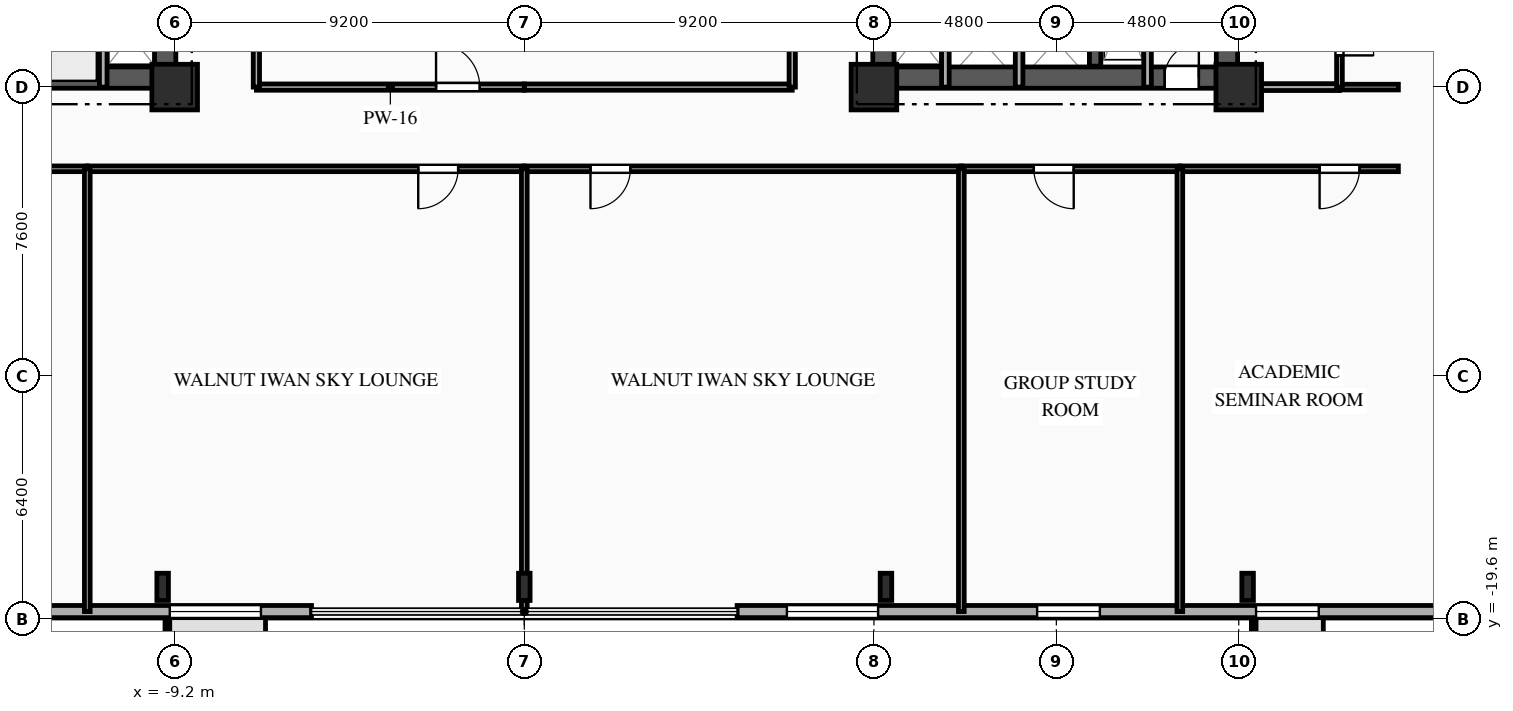
"""IFC4 building model, lengths in metres.
Left out: names, types, materials, properties, quantities, classifications, styles, units other than length and angle.
Written with IfcOpenShell. Run it as: python <this file> out.ifc"""

import sys

from ifc_helpers import new_model, si_unit, direction, frame, frame_2d, origin, origin_2d, place, context, subcontext, project, spatial, rectangle, i_section, extrude, element, fill, save


model = new_model("IFC4")
c1 = context("Model", 3, precision=1e-05, world=origin(), true_north=direction((0.0, 1.0)))
c2 = subcontext(c1, "Body", "Model", "MODEL_VIEW")
j1 = project(units=[si_unit("LENGTHUNIT", "METRE"), si_unit("PLANEANGLEUNIT", "RADIAN")], contexts=[c1])
p1 = place(None, origin())
s1 = spatial("IfcSite", under=j1, at=p1, CompositionType="ELEMENT")
p2 = place(p1, origin())
s2 = spatial("IfcBuilding", under=s1, at=p2, CompositionType="ELEMENT")
p3 = place(p2, frame((0.0, 0.0, 43.75)))
s3 = spatial("IfcBuildingStorey", under=s2, at=p3, CompositionType="ELEMENT", Elevation=43.75)
for number, where, z_axis, x_axis in (
    (1, (-9.2, -5.6, 0.0), (0.0, 0.0, 1.0), (1.0, 0.0, 0.0)),
    (2, (9.2, -5.6, 0.0), (0.0, 0.0, 1.0), (1.0, 0.0, 0.0)),
    (3, (18.8, -5.6, 0.0), (0.0, 0.0, 1.0), (1.0, 0.0, 0.0)),
):
    element("IfcColumn", number, at=place(p3, frame(where, z_axis=z_axis, x_axis=x_axis)), inside=s3, PredefinedType="COLUMN", context=c2, shape_type="SweptSolid", body=[
        extrude(rectangle(XDim=1.2, YDim=1.2, at=origin_2d()), origin(), (0.0, 0.0, 1.0), 3.35),
    ])
for number, where, z_axis, x_axis in (
    (4, (-9.517, -18.75, 0.0), (0.0, 0.0, 1.0), (1.0, 0.0, 0.0)),
    (5, (0.0, -18.75, 0.0), (0.0, 0.0, 1.0), (1.0, 0.0, 0.0)),
    (6, (9.517, -18.75, 0.0), (0.0, 0.0, 1.0), (1.0, 0.0, 0.0)),
    (7, (19.033, -18.75, 0.0), (0.0, 0.0, 1.0), (1.0, 0.0, 0.0)),
):
    element("IfcColumn", number, at=place(p3, frame(where, z_axis=z_axis, x_axis=x_axis)), inside=s3, PredefinedType="COLUMN", context=c2, shape_type="SweptSolid", body=[
        extrude(i_section(OverallWidth=0.304, OverallDepth=0.716, WebThickness=0.021, FlangeThickness=0.04, FilletRadius=0.027, at=origin_2d()), origin(), (0.0, 0.0, 1.0), 3.35),
    ])
p4 = place(p3, frame((29.2, -19.4, 0.0), z_axis=(0.0, 0.0, 1.0), x_axis=(-1.0, 0.0, 0.0)))
e8 = element("IfcWall", 8, at=p4, inside=s3, PredefinedType="SOLIDWALL", context=c2, shape_type="SweptSolid", body=[
    extrude(rectangle(XDim=23.6, YDim=0.32, at=frame_2d((11.8, 0.0))), origin(), (0.0, 0.0, 1.0), 3.035),
])
p5 = place(p4, frame((8.295, 0.0, 0.85)))
e9 = element("IfcOpeningElement", 9, at=p5, cuts=e8, PredefinedType="OPENING", context=c2, shape_type="SweptSolid", body=[
    extrude(rectangle(XDim=1.65, YDim=1.85, at=frame_2d((0.825, 0.925))), frame((0.0, 0.17, 0.0), z_axis=(0.0, -1.0, 0.0), x_axis=(1.0, 0.0, 0.0)), (0.0, 0.0, 1.0), 0.34),
])
p6 = place(p4, frame((14.055, 0.0, 0.85)))
e10 = element("IfcOpeningElement", 10, at=p6, cuts=e8, PredefinedType="OPENING", context=c2, shape_type="SweptSolid", body=[
    extrude(rectangle(XDim=1.65, YDim=1.85, at=frame_2d((0.825, 0.925))), frame((0.0, 0.17, 0.0), z_axis=(0.0, -1.0, 0.0), x_axis=(1.0, 0.0, 0.0)), (0.0, 0.0, 1.0), 0.34),
])
p7 = place(p4, frame((19.89, 0.0, 0.85)))
e11 = element("IfcOpeningElement", 11, at=p7, cuts=e8, PredefinedType="OPENING", context=c2, shape_type="SweptSolid", body=[
    extrude(rectangle(XDim=2.4, YDim=1.95, at=frame_2d((1.2, 0.975))), frame((0.0, 0.17, 0.0), z_axis=(0.0, -1.0, 0.0), x_axis=(1.0, 0.0, 0.0)), (0.0, 0.0, 1.0), 0.34),
])
p8 = place(p3, frame((-5.6, -19.4, 0.0), z_axis=(0.0, 0.0, 1.0), x_axis=(-1.0, 0.0, 0.0)))
e12 = element("IfcWall", 12, at=p8, inside=s3, PredefinedType="SOLIDWALL", context=c2, shape_type="SweptSolid", body=[
    extrude(rectangle(XDim=23.6, YDim=0.32, at=frame_2d((11.8, 0.0))), origin(), (0.0, 0.0, 1.0), 3.035),
])
p9 = place(p8, frame((1.33, 0.0, 0.85)))
e13 = element("IfcOpeningElement", 13, at=p9, cuts=e12, PredefinedType="OPENING", context=c2, shape_type="SweptSolid", body=[
    extrude(rectangle(XDim=2.4, YDim=1.95, at=frame_2d((1.2, 0.975))), frame((0.0, 0.17, 0.0), z_axis=(0.0, -1.0, 0.0), x_axis=(1.0, 0.0, 0.0)), (0.0, 0.0, 1.0), 0.34),
])
p10 = place(p8, frame((7.975, 0.0, 0.85)))
e14 = element("IfcOpeningElement", 14, at=p10, cuts=e12, PredefinedType="OPENING", context=c2, shape_type="SweptSolid", body=[
    extrude(rectangle(XDim=1.65, YDim=1.85, at=frame_2d((0.825, 0.925))), frame((0.0, 0.17, 0.0), z_axis=(0.0, -1.0, 0.0), x_axis=(1.0, 0.0, 0.0)), (0.0, 0.0, 1.0), 0.34),
])
p11 = place(p8, frame((13.735, 0.0, 0.85)))
e15 = element("IfcOpeningElement", 15, at=p11, cuts=e12, PredefinedType="OPENING", context=c2, shape_type="SweptSolid", body=[
    extrude(rectangle(XDim=1.65, YDim=1.85, at=frame_2d((0.825, 0.925))), frame((0.0, 0.17, 0.0), z_axis=(0.0, -1.0, 0.0), x_axis=(1.0, 0.0, 0.0)), (0.0, 0.0, 1.0), 0.34),
])
p12 = place(p3, frame((-18.8, -5.35, 0.0), z_axis=(0.0, 0.0, 1.0), x_axis=(1.0, 0.0, 0.0)))
e16 = element("IfcWall", 16, at=p12, inside=s3, PredefinedType="SHEAR", context=c2, shape_type="SweptSolid", body=[
    extrude(rectangle(XDim=9.6, YDim=0.56, at=frame_2d((4.8, 0.0))), origin(), (0.0, 0.0, 1.0), 3.035),
])
p13 = place(p12, frame((1.05, 0.0, 0.0)))
e17 = element("IfcOpeningElement", 17, at=p13, cuts=e16, PredefinedType="OPENING", context=c2, shape_type="SweptSolid", body=[
    extrude(rectangle(XDim=0.9, YDim=2.1, at=frame_2d((0.45, 1.05))), frame((0.0, 0.29, 0.0), z_axis=(0.0, -1.0, 0.0), x_axis=(1.0, 0.0, 0.0)), (0.0, 0.0, 1.0), 0.58),
])
p14 = place(p3, frame((-9.45, -5.05, 0.0), z_axis=(0.0, 0.0, 1.0), x_axis=(0.0, 1.0, 0.0)))
e18 = element("IfcWall", 18, at=p14, inside=s3, PredefinedType="SHEAR", context=c2, shape_type="SweptSolid", body=[
    extrude(rectangle(XDim=10.1, YDim=0.56, at=frame_2d((5.05, 0.0))), origin(), (0.0, 0.0, 1.0), 3.035),
])
p15 = place(p14, frame((7.175, 0.0, 0.0)))
e19 = element("IfcOpeningElement", 19, at=p15, cuts=e18, PredefinedType="OPENING", context=c2, shape_type="SweptSolid", body=[
    extrude(rectangle(XDim=0.9, YDim=2.1, at=frame_2d((0.45, 1.05))), frame((0.0, 0.29, 0.0), z_axis=(0.0, -1.0, 0.0), x_axis=(1.0, 0.0, 0.0)), (0.0, 0.0, 1.0), 0.58),
])
p16 = place(p14, frame((2.4, 0.0, 0.0)))
e20 = element("IfcOpeningElement", 20, at=p16, cuts=e18, PredefinedType="OPENING", context=c2, shape_type="SweptSolid", body=[
    extrude(rectangle(XDim=1.2, YDim=2.15, at=frame_2d((0.6, 1.075))), frame((0.0, 0.29, 0.0), z_axis=(0.0, -1.0, 0.0), x_axis=(1.0, 0.0, 0.0)), (0.0, 0.0, 1.0), 0.58),
])
p17 = place(p3, frame((9.2, -5.35, 0.0), z_axis=(0.0, 0.0, 1.0), x_axis=(1.0, 0.0, 0.0)))
e21 = element("IfcWall", 21, at=p17, inside=s3, PredefinedType="SHEAR", context=c2, shape_type="SweptSolid", body=[
    extrude(rectangle(XDim=9.6, YDim=0.56, at=frame_2d((4.8, 0.0))), origin(), (0.0, 0.0, 1.0), 3.035),
])
p18 = place(p17, frame((7.65, 0.0, 0.0)))
e22 = element("IfcOpeningElement", 22, at=p18, cuts=e21, PredefinedType="OPENING", context=c2, shape_type="SweptSolid", body=[
    extrude(rectangle(XDim=0.9, YDim=2.1, at=frame_2d((0.45, 1.05))), frame((0.0, 0.29, 0.0), z_axis=(0.0, -1.0, 0.0), x_axis=(1.0, 0.0, 0.0)), (0.0, 0.0, 1.0), 0.58),
])
p19 = place(p3, frame((9.45, -5.05, 0.0), z_axis=(0.0, 0.0, 1.0), x_axis=(0.0, 1.0, 0.0)))
e23 = element("IfcWall", 23, at=p19, inside=s3, PredefinedType="SHEAR", context=c2, shape_type="SweptSolid", body=[
    extrude(rectangle(XDim=10.1, YDim=0.56, at=frame_2d((5.05, 0.0))), origin(), (0.0, 0.0, 1.0), 3.035),
])
p20 = place(p19, frame((7.15, 0.0, 0.0)))
e24 = element("IfcOpeningElement", 24, at=p20, cuts=e23, PredefinedType="OPENING", context=c2, shape_type="SweptSolid", body=[
    extrude(rectangle(XDim=0.9, YDim=2.1, at=frame_2d((0.45, 1.05))), frame((0.0, 0.29, 0.0), z_axis=(0.0, -1.0, 0.0), x_axis=(1.0, 0.0, 0.0)), (0.0, 0.0, 1.0), 0.58),
])
p21 = place(p19, frame((2.4, 0.0, 0.0)))
e25 = element("IfcOpeningElement", 25, at=p21, cuts=e23, PredefinedType="OPENING", context=c2, shape_type="SweptSolid", body=[
    extrude(rectangle(XDim=1.2, YDim=2.15, at=frame_2d((0.6, 1.075))), frame((0.0, 0.29, 0.0), z_axis=(0.0, -1.0, 0.0), x_axis=(1.0, 0.0, 0.0)), (0.0, 0.0, 1.0), 0.58),
])
p22 = place(p3, frame((18.49, -5.05, 0.0), z_axis=(0.0, 0.0, 1.0), x_axis=(0.0, 1.0, 0.0)))
e26 = element("IfcWall", 26, at=p22, inside=s3, PredefinedType="SHEAR", context=c2, shape_type="SweptSolid", body=[
    extrude(rectangle(XDim=10.1, YDim=0.56, at=frame_2d((5.05, 0.0))), origin(), (0.0, 0.0, 1.0), 3.035),
])
p23 = place(p3, frame((15.02, -5.05, 0.0), z_axis=(0.0, 0.0, 1.0), x_axis=(0.0, 1.0, 0.0)))
e27 = element("IfcWall", 27, at=p23, inside=s3, PredefinedType="SHEAR", context=c2, shape_type="SweptSolid", body=[
    extrude(rectangle(XDim=10.1, YDim=0.3, at=frame_2d((5.05, 0.0))), origin(), (0.0, 0.0, 1.0), 3.035),
])
p24 = place(p3, frame((-11.08, -5.6, 0.0), z_axis=(0.0, 0.0, 1.0), x_axis=(0.0, 1.0, 0.0)))
e28 = element("IfcWall", 28, at=p24, inside=s3, PredefinedType="PARTITIONING", context=c2, shape_type="SweptSolid", body=[
    extrude(rectangle(XDim=2.25, YDim=0.2, at=frame_2d((1.125, 0.0))), origin(), (0.0, 0.0, 1.0), 3.035),
])
p25 = place(p3, frame((16.4, -2.11, 0.0), z_axis=(0.0, 0.0, 1.0), x_axis=(0.0, -1.0, 0.0)))
e29 = element("IfcWall", 29, at=p25, inside=s3, PredefinedType="PARTITIONING", context=c2, shape_type="SweptSolid", body=[
    extrude(rectangle(XDim=3.49, YDim=0.2, at=frame_2d((1.745, 0.0))), origin(), (0.0, 0.0, 1.0), 3.035),
])
for number, where, z_axis, x_axis in (
    (30, (11.08, -5.6, 0.0), (0.0, 0.0, 1.0), (0.0, 1.0, 0.0)),
    (31, (13.02, -5.6, 0.0), (0.0, 0.0, 1.0), (0.0, 1.0, 0.0)),
):
    element("IfcWall", number, at=place(p3, frame(where, z_axis=z_axis, x_axis=x_axis)), inside=s3, PredefinedType="PARTITIONING", context=c2, shape_type="SweptSolid", body=[
        extrude(rectangle(XDim=2.25, YDim=0.2, at=frame_2d((1.125, 0.0))), origin(), (0.0, 0.0, 1.0), 3.035),
    ])
p26 = place(p3, frame((-11.5, -7.75, 0.0), z_axis=(0.0, 0.0, 1.0), x_axis=(-1.0, 0.0, 0.0)))
e32 = element("IfcWall", 32, at=p26, inside=s3, PredefinedType="PARTITIONING", context=c2, shape_type="SweptSolid", body=[
    extrude(rectangle(XDim=5.75, YDim=0.15, at=frame_2d((2.875, 0.0))), origin(), (0.0, 0.0, 1.0), 3.035),
])
p27 = place(p26, frame((1.907, 0.0, 0.0)))
e33 = element("IfcOpeningElement", 33, at=p27, cuts=e32, PredefinedType="OPENING", context=c2, shape_type="SweptSolid", body=[
    extrude(rectangle(XDim=1.05, YDim=2.15, at=frame_2d((0.525, 1.075))), frame((0.0, 0.085, 0.0), z_axis=(0.0, -1.0, 0.0), x_axis=(1.0, 0.0, 0.0)), (0.0, 0.0, 1.0), 0.17),
])
p28 = place(p3, frame((0.0, -7.75, 0.0), z_axis=(0.0, 0.0, 1.0), x_axis=(-1.0, 0.0, 0.0)))
e34 = element("IfcWall", 34, at=p28, inside=s3, PredefinedType="PARTITIONING", context=c2, shape_type="SweptSolid", body=[
    extrude(rectangle(XDim=11.5, YDim=0.15, at=frame_2d((5.75, 0.0))), origin(), (0.0, 0.0, 1.0), 3.035),
])
p29 = place(p28, frame((1.741, 0.0, 0.0)))
e35 = element("IfcOpeningElement", 35, at=p29, cuts=e34, PredefinedType="OPENING", context=c2, shape_type="SweptSolid", body=[
    extrude(rectangle(XDim=1.05, YDim=2.15, at=frame_2d((0.525, 1.075))), frame((0.0, 0.085, 0.0), z_axis=(0.0, -1.0, 0.0), x_axis=(1.0, 0.0, 0.0)), (0.0, 0.0, 1.0), 0.17),
])
p30 = place(p3, frame((-7.05, -5.6, 0.0), z_axis=(0.0, 0.0, 1.0), x_axis=(1.0, 0.0, 0.0)))
e36 = element("IfcWall", 36, at=p30, inside=s3, PredefinedType="PARTITIONING", context=c2, shape_type="SweptSolid", body=[
    extrude(rectangle(XDim=7.05, YDim=0.165, at=frame_2d((3.525, 0.0))), origin(), (0.0, 0.0, 1.0), 2.52),
])
p31 = place(p30, frame((4.728, 0.0, 0.0)))
e37 = element("IfcOpeningElement", 37, at=p31, cuts=e36, PredefinedType="OPENING", context=c2, shape_type="SweptSolid", body=[
    extrude(rectangle(XDim=1.15, YDim=2.15, at=frame_2d((0.575, 1.075))), frame((0.0, 0.093, 0.0), z_axis=(0.0, -1.0, 0.0), x_axis=(1.0, 0.0, 0.0)), (0.0, 0.0, 1.0), 0.185),
])
p32 = place(p3, frame((18.8, -5.6, 0.0), z_axis=(0.0, 0.0, 1.0), x_axis=(1.0, 0.0, 0.0)))
e38 = element("IfcWall", 38, at=p32, inside=s3, PredefinedType="PARTITIONING", context=c2, shape_type="SweptSolid", body=[
    extrude(rectangle(XDim=2.65, YDim=0.18, at=frame_2d((1.325, 0.0))), origin(), (0.0, 0.0, 1.0), 3.035),
])
p33 = place(p3, frame((21.45, -5.6, 0.0), z_axis=(0.0, 0.0, 1.0), x_axis=(1.0, 0.0, 0.0)))
e39 = element("IfcWall", 39, at=p33, inside=s3, PredefinedType="PLUMBINGWALL", context=c2, shape_type="SweptSolid", body=[
    extrude(rectangle(XDim=1.55, YDim=0.15, at=frame_2d((0.775, 0.0))), origin(), (0.0, 0.0, 1.0), 3.035),
])
p34 = place(p3, frame((11.5, -7.75, 0.0), z_axis=(0.0, 0.0, 1.0), x_axis=(-1.0, 0.0, 0.0)))
e40 = element("IfcWall", 40, at=p34, inside=s3, PredefinedType="PARTITIONING", context=c2, shape_type="SweptSolid", body=[
    extrude(rectangle(XDim=11.5, YDim=0.15, at=frame_2d((5.75, 0.0))), origin(), (0.0, 0.0, 1.0), 3.035),
])
p35 = place(p34, frame((8.709, 0.0, 0.0)))
e41 = element("IfcOpeningElement", 41, at=p35, cuts=e40, PredefinedType="OPENING", context=c2, shape_type="SweptSolid", body=[
    extrude(rectangle(XDim=1.05, YDim=2.15, at=frame_2d((0.525, 1.075))), frame((0.0, 0.085, 0.0), z_axis=(0.0, -1.0, 0.0), x_axis=(1.0, 0.0, 0.0)), (0.0, 0.0, 1.0), 0.17),
])
p36 = place(p3, frame((17.25, -7.75, 0.0), z_axis=(0.0, 0.0, 1.0), x_axis=(-1.0, 0.0, 0.0)))
e42 = element("IfcWall", 42, at=p36, inside=s3, PredefinedType="PARTITIONING", context=c2, shape_type="SweptSolid", body=[
    extrude(rectangle(XDim=5.75, YDim=0.15, at=frame_2d((2.875, 0.0))), origin(), (0.0, 0.0, 1.0), 3.035),
])
p37 = place(p36, frame((2.792, 0.0, 0.0)))
e43 = element("IfcOpeningElement", 43, at=p37, cuts=e42, PredefinedType="OPENING", context=c2, shape_type="SweptSolid", body=[
    extrude(rectangle(XDim=1.05, YDim=2.15, at=frame_2d((0.525, 1.075))), frame((0.0, 0.085, 0.0), z_axis=(0.0, -1.0, 0.0), x_axis=(1.0, 0.0, 0.0)), (0.0, 0.0, 1.0), 0.17),
])
p38 = place(p3, frame((23.0, -7.75, 0.0), z_axis=(0.0, 0.0, 1.0), x_axis=(-1.0, 0.0, 0.0)))
e44 = element("IfcWall", 44, at=p38, inside=s3, PredefinedType="PARTITIONING", context=c2, shape_type="SweptSolid", body=[
    extrude(rectangle(XDim=5.75, YDim=0.15, at=frame_2d((2.875, 0.0))), origin(), (0.0, 0.0, 1.0), 3.035),
])
p39 = place(p38, frame((1.022, 0.0, 0.0)))
e45 = element("IfcOpeningElement", 45, at=p39, cuts=e44, PredefinedType="OPENING", context=c2, shape_type="SweptSolid", body=[
    extrude(rectangle(XDim=1.05, YDim=2.15, at=frame_2d((0.525, 1.075))), frame((0.0, 0.085, 0.0), z_axis=(0.0, -1.0, 0.0), x_axis=(1.0, 0.0, 0.0)), (0.0, 0.0, 1.0), 0.17),
])
p40 = place(p3, frame((0.0, -5.6, 0.0), z_axis=(0.0, 0.0, 1.0), x_axis=(1.0, 0.0, 0.0)))
e46 = element("IfcWall", 46, at=p40, inside=s3, PredefinedType="PARTITIONING", context=c2, shape_type="SweptSolid", body=[
    extrude(rectangle(XDim=7.05, YDim=0.165, at=frame_2d((3.525, 0.0))), origin(), (0.0, 0.0, 1.0), 2.52),
])
for number, where, z_axis, x_axis in (
    (47, (-7.05, 1.45, 0.0), (0.0, 0.0, 1.0), (0.0, -1.0, 0.0)),
    (48, (7.05, -5.6, 0.0), (0.0, 0.0, 1.0), (0.0, 1.0, 0.0)),
):
    element("IfcWall", number, at=place(p3, frame(where, z_axis=z_axis, x_axis=x_axis)), inside=s3, PredefinedType="PARTITIONING", context=c2, shape_type="SweptSolid", body=[
        extrude(rectangle(XDim=7.05, YDim=0.165, at=frame_2d((3.525, 0.0))), origin(), (0.0, 0.0, 1.0), 3.035),
    ])
p41 = place(p3, frame((21.45, -3.25, 0.0), z_axis=(0.0, 0.0, 1.0), x_axis=(0.0, -1.0, 0.0)))
e49 = element("IfcWall", 49, at=p41, inside=s3, PredefinedType="PLUMBINGWALL", context=c2, shape_type="SweptSolid", body=[
    extrude(rectangle(XDim=2.35, YDim=0.15, at=frame_2d((1.175, 0.0))), origin(), (0.0, 0.0, 1.0), 3.035),
])
p42 = place(p41, frame((0.616, 0.0, 0.0)))
e50 = element("IfcOpeningElement", 50, at=p42, cuts=e49, PredefinedType="OPENING", context=c2, shape_type="SweptSolid", body=[
    extrude(rectangle(XDim=0.9, YDim=2.1, at=frame_2d((0.45, 1.05))), frame((0.0, 0.085, 0.0), z_axis=(0.0, -1.0, 0.0), x_axis=(1.0, 0.0, 0.0)), (0.0, 0.0, 1.0), 0.17),
])
for number, where, z_axis, x_axis in (
    (51, (-11.5, -7.75, 0.0), (0.0, 0.0, 1.0), (0.0, -1.0, 0.0)),
    (52, (0.0, -7.75, 0.0), (0.0, 0.0, 1.0), (0.0, -1.0, 0.0)),
    (53, (11.5, -7.75, 0.0), (0.0, 0.0, 1.0), (0.0, -1.0, 0.0)),
    (54, (17.25, -7.75, 0.0), (0.0, 0.0, 1.0), (0.0, -1.0, 0.0)),
):
    element("IfcWall", number, at=place(p3, frame(where, z_axis=z_axis, x_axis=x_axis)), inside=s3, PredefinedType="PARTITIONING", context=c2, shape_type="SweptSolid", body=[
        extrude(rectangle(XDim=11.65, YDim=0.15, at=frame_2d((5.825, 0.0))), origin(), (0.0, 0.0, 1.0), 3.035),
    ])
p43 = place(p5, origin())
e55 = element("IfcWindow", 55, at=p43, inside=s3, PartitioningType="SINGLE_PANEL", PredefinedType="WINDOW", context=c2, shape_type="SweptSolid", body=[
    extrude(rectangle(XDim=1.65, YDim=1.85, at=frame_2d((0.825, 0.925))), frame((0.0, 0.03, 0.0), z_axis=(0.0, -1.0, 0.0), x_axis=(1.0, 0.0, 0.0)), (0.0, 0.0, 1.0), 0.06),
])
fill(e9, e55)
p44 = place(p6, origin())
e56 = element("IfcWindow", 56, at=p44, inside=s3, PartitioningType="SINGLE_PANEL", PredefinedType="WINDOW", context=c2, shape_type="SweptSolid", body=[
    extrude(rectangle(XDim=1.65, YDim=1.85, at=frame_2d((0.825, 0.925))), frame((0.0, 0.03, 0.0), z_axis=(0.0, -1.0, 0.0), x_axis=(1.0, 0.0, 0.0)), (0.0, 0.0, 1.0), 0.06),
])
fill(e10, e56)
p45 = place(p7, origin())
e57 = element("IfcWindow", 57, at=p45, inside=s3, PartitioningType="SINGLE_PANEL", PredefinedType="WINDOW", context=c2, shape_type="SweptSolid", body=[
    extrude(rectangle(XDim=2.4, YDim=1.95, at=frame_2d((1.2, 0.975))), frame((0.0, 0.03, 0.0), z_axis=(0.0, -1.0, 0.0), x_axis=(1.0, 0.0, 0.0)), (0.0, 0.0, 1.0), 0.06),
])
fill(e11, e57)
p46 = place(p9, origin())
e58 = element("IfcWindow", 58, at=p46, inside=s3, PartitioningType="SINGLE_PANEL", PredefinedType="WINDOW", context=c2, shape_type="SweptSolid", body=[
    extrude(rectangle(XDim=2.4, YDim=1.95, at=frame_2d((1.2, 0.975))), frame((0.0, 0.03, 0.0), z_axis=(0.0, -1.0, 0.0), x_axis=(1.0, 0.0, 0.0)), (0.0, 0.0, 1.0), 0.06),
])
fill(e13, e58)
p47 = place(p18, origin())
e59 = element("IfcDoor", 59, at=p47, inside=s3, OperationType="SINGLE_SWING_RIGHT", PredefinedType="DOOR", context=c2, shape_type="SweptSolid", body=[
    extrude(rectangle(XDim=0.9, YDim=2.1, at=frame_2d((0.45, 1.05))), frame((0.0, 0.025, 0.0), z_axis=(0.0, -1.0, 0.0), x_axis=(1.0, 0.0, 0.0)), (0.0, 0.0, 1.0), 0.05),
])
fill(e22, e59)
p48 = place(p29, origin())
e60 = element("IfcDoor", 60, at=p48, inside=s3, OperationType="SINGLE_SWING_RIGHT", PredefinedType="DOOR", context=c2, shape_type="SweptSolid", body=[
    extrude(rectangle(XDim=1.05, YDim=2.15, at=frame_2d((0.525, 1.075))), frame((0.0, 0.025, 0.0), z_axis=(0.0, -1.0, 0.0), x_axis=(1.0, 0.0, 0.0)), (0.0, 0.0, 1.0), 0.05),
])
fill(e35, e60)
p49 = place(p31, origin())
e61 = element("IfcDoor", 61, at=p49, inside=s3, OperationType="SINGLE_SWING_LEFT", PredefinedType="DOOR", context=c2, shape_type="SweptSolid", body=[
    extrude(rectangle(XDim=1.15, YDim=2.15, at=frame_2d((0.575, 1.075))), frame((0.0, 0.025, 0.0), z_axis=(0.0, -1.0, 0.0), x_axis=(1.0, 0.0, 0.0)), (0.0, 0.0, 1.0), 0.05),
])
fill(e37, e61)
p50 = place(p35, origin())
e62 = element("IfcDoor", 62, at=p50, inside=s3, OperationType="SINGLE_SWING_RIGHT", PredefinedType="DOOR", context=c2, shape_type="SweptSolid", body=[
    extrude(rectangle(XDim=1.05, YDim=2.15, at=frame_2d((0.525, 1.075))), frame((0.0, 0.025, 0.0), z_axis=(0.0, -1.0, 0.0), x_axis=(1.0, 0.0, 0.0)), (0.0, 0.0, 1.0), 0.05),
])
fill(e41, e62)
p51 = place(p37, origin())
e63 = element("IfcDoor", 63, at=p51, inside=s3, OperationType="SINGLE_SWING_LEFT", PredefinedType="DOOR", context=c2, shape_type="SweptSolid", body=[
    extrude(rectangle(XDim=1.05, YDim=2.15, at=frame_2d((0.525, 1.075))), frame((0.0, 0.025, 0.0), z_axis=(0.0, -1.0, 0.0), x_axis=(1.0, 0.0, 0.0)), (0.0, 0.0, 1.0), 0.05),
])
fill(e43, e63)
p52 = place(p39, origin())
e64 = element("IfcDoor", 64, at=p52, inside=s3, OperationType="SINGLE_SWING_RIGHT", PredefinedType="DOOR", context=c2, shape_type="SweptSolid", body=[
    extrude(rectangle(XDim=1.05, YDim=2.15, at=frame_2d((0.525, 1.075))), frame((0.0, 0.025, 0.0), z_axis=(0.0, -1.0, 0.0), x_axis=(1.0, 0.0, 0.0)), (0.0, 0.0, 1.0), 0.05),
])
fill(e45, e64)
p53 = place(p42, origin())
e65 = element("IfcDoor", 65, at=p53, inside=s3, OperationType="SINGLE_SWING_RIGHT", PredefinedType="DOOR", context=c2, shape_type="SweptSolid", body=[
    extrude(rectangle(XDim=0.9, YDim=2.1, at=frame_2d((0.45, 1.05))), frame((0.0, 0.025, 0.0), z_axis=(0.0, -1.0, 0.0), x_axis=(1.0, 0.0, 0.0)), (0.0, 0.0, 1.0), 0.05),
])
fill(e50, e65)
save(model, sys.argv[1])
